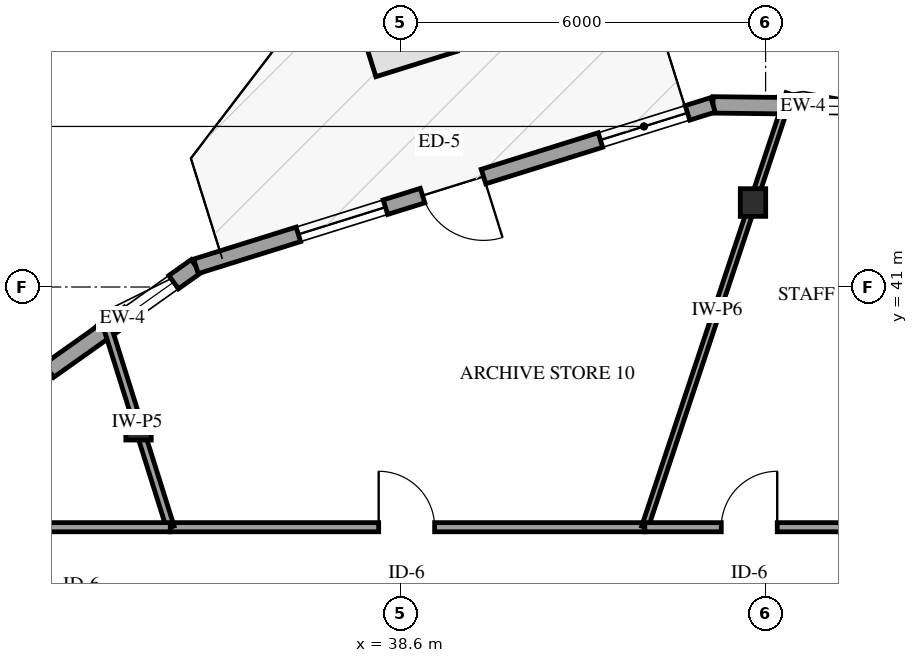
"""IFC4 building model, lengths in metres.
Left out: names, types, materials, properties, quantities, classifications, styles, units other than length and angle.
Written with IfcOpenShell. Run it as: python <this file> out.ifc"""

import sys

from ifc_helpers import new_model, si_unit, direction, frame, frame_2d, origin, origin_2d, place, context, subcontext, project, spatial, rectangle, i_section, extrude, element, fill, save


model = new_model("IFC4")
c1 = context("Model", 3, precision=1e-05, world=origin(), true_north=direction((0.0, 1.0)))
c2 = subcontext(c1, "Body", "Model", "MODEL_VIEW")
j1 = project(units=[si_unit("LENGTHUNIT", "METRE"), si_unit("PLANEANGLEUNIT", "RADIAN")], contexts=[c1])
p1 = place(None, origin())
s1 = spatial("IfcSite", under=j1, at=p1, CompositionType="ELEMENT")
p2 = place(p1, origin())
s2 = spatial("IfcBuilding", under=s1, at=p2, CompositionType="ELEMENT")
p3 = place(p2, frame((0.0, 0.0, 95.2)))
s3 = spatial("IfcBuildingStorey", under=s2, at=p3, CompositionType="ELEMENT", Elevation=95.2)
for number, where, z_axis, x_axis in (
    (1, (44.393, 42.389, 0.0), (0.0, 0.0, 1.0), (1.0, 0.0, 0.0)),
    (2, (34.288, 38.711, 0.0), (0.0, 0.0, 1.0), (1.0, 0.0, 0.0)),
):
    element("IfcColumn", number, at=place(p3, frame(where, z_axis=z_axis, x_axis=x_axis)), inside=s3, PredefinedType="COLUMN", context=c2, shape_type="SweptSolid", body=[
        extrude(i_section(OverallWidth=0.418, OverallDepth=0.455, WebThickness=0.042, FlangeThickness=0.068, FilletRadius=0.038, at=origin_2d()), origin(), (0.0, 0.0, 1.0), 3.9),
    ])
p4 = place(p3, frame((46.702, 43.961, 0.0), z_axis=(0.0, 0.0, 1.0), x_axis=(-0.99993363199, 0.011520920787, 0.0)))
e3 = element("IfcWall", 3, at=p4, inside=s3, PredefinedType="SOLIDWALL", context=c2, shape_type="SweptSolid", body=[
    extrude(rectangle(XDim=2.967, YDim=0.27, at=frame_2d((1.483, 0.0))), origin(), (0.0, 0.0, 1.0), 2.979),
])
p5 = place(p4, frame((0.45, 0.0, 0.75)))
e4 = element("IfcOpeningElement", 4, at=p5, cuts=e3, PredefinedType="OPENING", context=c2, shape_type="SweptSolid", body=[
    extrude(rectangle(XDim=0.9, YDim=1.5, at=frame_2d((0.45, 0.75))), frame((0.0, 0.145, 0.0), z_axis=(0.0, -1.0, 0.0), x_axis=(1.0, 0.0, 0.0)), (0.0, 0.0, 1.0), 0.29),
])
p6 = place(p3, frame((35.232, 41.34, 0.0), z_axis=(0.0, 0.0, 1.0), x_axis=(-0.815686288548, -0.57849449321, 0.0)))
e5 = element("IfcWall", 5, at=p6, inside=s3, PredefinedType="SOLIDWALL", context=c2, shape_type="SweptSolid", body=[
    extrude(rectangle(XDim=2.967, YDim=0.27, at=frame_2d((1.483, 0.0))), origin(), (0.0, 0.0, 1.0), 2.979),
])
p7 = place(p6, frame((0.45, 0.0, 0.75)))
e6 = element("IfcOpeningElement", 6, at=p7, cuts=e5, PredefinedType="OPENING", context=c2, shape_type="SweptSolid", body=[
    extrude(rectangle(XDim=0.9, YDim=1.5, at=frame_2d((0.45, 0.75))), frame((0.0, 0.145, 0.0), z_axis=(0.0, -1.0, 0.0), x_axis=(1.0, 0.0, 0.0)), (0.0, 0.0, 1.0), 0.29),
])
p8 = place(p3, frame((43.735, 43.995, 0.0), z_axis=(0.0, 0.0, 1.0), x_axis=(-0.954555531523, -0.298033114332, 0.0)))
e7 = element("IfcWall", 7, at=p8, inside=s3, PredefinedType="SOLIDWALL", context=c2, shape_type="SweptSolid", body=[
    extrude(rectangle(XDim=8.908, YDim=0.25, at=frame_2d((4.454, 0.0))), origin(), (0.0, 0.0, 1.0), 2.979),
])
p9 = place(p8, frame((3.954, 0.0, 0.0)))
e8 = element("IfcOpeningElement", 8, at=p9, cuts=e7, PredefinedType="OPENING", context=c2, shape_type="SweptSolid", body=[
    extrude(rectangle(XDim=1.05, YDim=2.15, at=frame_2d((0.525, 1.075))), frame((0.0, 0.135, 0.0), z_axis=(0.0, -1.0, 0.0), x_axis=(1.0, 0.0, 0.0)), (0.0, 0.0, 1.0), 0.27),
])
p10 = place(p8, frame((0.44, 0.0, 0.72)))
e9 = element("IfcOpeningElement", 9, at=p10, cuts=e7, PredefinedType="OPENING", context=c2, shape_type="SweptSolid", body=[
    extrude(rectangle(XDim=1.5, YDim=1.7, at=frame_2d((0.75, 0.85))), frame((0.0, 0.135, 0.0), z_axis=(0.0, -1.0, 0.0), x_axis=(1.0, 0.0, 0.0)), (0.0, 0.0, 1.0), 0.27),
])
p11 = place(p8, frame((5.644, 0.0, 0.72)))
e10 = element("IfcOpeningElement", 10, at=p11, cuts=e7, PredefinedType="OPENING", context=c2, shape_type="SweptSolid", body=[
    extrude(rectangle(XDim=1.5, YDim=1.7, at=frame_2d((0.75, 0.85))), frame((0.0, 0.135, 0.0), z_axis=(0.0, -1.0, 0.0), x_axis=(1.0, 0.0, 0.0)), (0.0, 0.0, 1.0), 0.27),
])
p12 = place(p3, frame((34.81, 37.05, 0.0), z_axis=(0.0, 0.0, 1.0), x_axis=(1.0, 0.0, 0.0)))
e11 = element("IfcWall", 11, at=p12, inside=s3, PredefinedType="PARTITIONING", context=c2, shape_type="SweptSolid", body=[
    extrude(rectangle(XDim=7.804, YDim=0.15, at=frame_2d((3.902, 0.0))), origin(), (0.0, 0.0, 1.0), 3.6),
])
p13 = place(p12, frame((3.427, 0.0, 0.0)))
e12 = element("IfcOpeningElement", 12, at=p13, cuts=e11, PredefinedType="OPENING", context=c2, shape_type="SweptSolid", body=[
    extrude(rectangle(XDim=0.92, YDim=2.12, at=frame_2d((0.46, 1.06))), frame((0.0, 0.085, 0.0), z_axis=(0.0, -1.0, 0.0), x_axis=(1.0, 0.0, 0.0)), (0.0, 0.0, 1.0), 0.17),
])
p14 = place(p3, frame((42.614, 37.05, 0.0), z_axis=(0.0, 0.0, 1.0), x_axis=(0.316071805261, 0.948735270726, 0.0)))
e13 = element("IfcWall", 13, at=p14, inside=s3, PredefinedType="PARTITIONING", context=c2, shape_type="SweptSolid", body=[
    extrude(rectangle(XDim=7.514, YDim=0.11, at=frame_2d((3.757, 0.0))), origin(), (0.0, 0.0, 1.0), 2.895),
])
p15 = place(p3, frame((34.81, 37.05, 0.0), z_axis=(0.0, 0.0, 1.0), x_axis=(-0.300097719363, 0.953908464599, 0.0)))
e14 = element("IfcWall", 14, at=p15, inside=s3, PredefinedType="PARTITIONING", context=c2, shape_type="SweptSolid", body=[
    extrude(rectangle(XDim=3.629, YDim=0.13, at=frame_2d((1.814, 0.0))), origin(), (0.0, 0.0, 1.0), 2.895),
])
p16 = place(p3, frame((42.614, 37.05, 0.0), z_axis=(0.0, 0.0, 1.0), x_axis=(1.0, 0.0, 0.0)))
e15 = element("IfcWall", 15, at=p16, inside=s3, PredefinedType="PARTITIONING", context=c2, shape_type="SweptSolid", body=[
    extrude(rectangle(XDim=3.463, YDim=0.15, at=frame_2d((1.731, 0.0))), origin(), (0.0, 0.0, 1.0), 3.6),
])
p17 = place(p16, frame((1.257, 0.0, 0.0)))
e16 = element("IfcOpeningElement", 16, at=p17, cuts=e15, PredefinedType="OPENING", context=c2, shape_type="SweptSolid", body=[
    extrude(rectangle(XDim=0.92, YDim=2.12, at=frame_2d((0.46, 1.06))), frame((0.0, 0.085, 0.0), z_axis=(0.0, -1.0, 0.0), x_axis=(1.0, 0.0, 0.0)), (0.0, 0.0, 1.0), 0.17),
])
p18 = place(p3, frame((32.67, 37.05, 0.0), z_axis=(0.0, 0.0, 1.0), x_axis=(1.0, 0.0, 0.0)))
e17 = element("IfcWall", 17, at=p18, inside=s3, PredefinedType="PARTITIONING", context=c2, shape_type="SweptSolid", body=[
    extrude(rectangle(XDim=2.14, YDim=0.15, at=frame_2d((1.07, 0.0))), origin(), (0.0, 0.0, 1.0), 3.6),
])
p19 = place(p5, origin())
e18 = element("IfcWindow", 18, at=p19, inside=s3, PartitioningType="SINGLE_PANEL", PredefinedType="WINDOW", context=c2, shape_type="SweptSolid", body=[
    extrude(rectangle(XDim=0.9, YDim=1.5, at=frame_2d((0.45, 0.75))), frame((0.0, 0.03, 0.0), z_axis=(0.0, -1.0, 0.0), x_axis=(1.0, 0.0, 0.0)), (0.0, 0.0, 1.0), 0.06),
])
fill(e4, e18)
p20 = place(p7, origin())
e19 = element("IfcWindow", 19, at=p20, inside=s3, PartitioningType="SINGLE_PANEL", PredefinedType="WINDOW", context=c2, shape_type="SweptSolid", body=[
    extrude(rectangle(XDim=0.9, YDim=1.5, at=frame_2d((0.45, 0.75))), frame((0.0, 0.03, 0.0), z_axis=(0.0, -1.0, 0.0), x_axis=(1.0, 0.0, 0.0)), (0.0, 0.0, 1.0), 0.06),
])
fill(e6, e19)
p21 = place(p9, origin())
e20 = element("IfcDoor", 20, at=p21, inside=s3, OperationType="SINGLE_SWING_LEFT", PredefinedType="DOOR", context=c2, shape_type="SweptSolid", body=[
    extrude(rectangle(XDim=1.05, YDim=2.15, at=frame_2d((0.525, 1.075))), frame((0.0, 0.025, 0.0), z_axis=(0.0, -1.0, 0.0), x_axis=(1.0, 0.0, 0.0)), (0.0, 0.0, 1.0), 0.05),
])
fill(e8, e20)
p22 = place(p10, origin())
e21 = element("IfcWindow", 21, at=p22, inside=s3, PartitioningType="SINGLE_PANEL", PredefinedType="WINDOW", context=c2, shape_type="SweptSolid", body=[
    extrude(rectangle(XDim=1.5, YDim=1.7, at=frame_2d((0.75, 0.85))), frame((0.0, 0.03, 0.0), z_axis=(0.0, -1.0, 0.0), x_axis=(1.0, 0.0, 0.0)), (0.0, 0.0, 1.0), 0.06),
])
fill(e9, e21)
p23 = place(p11, origin())
e22 = element("IfcWindow", 22, at=p23, inside=s3, PartitioningType="SINGLE_PANEL", PredefinedType="WINDOW", context=c2, shape_type="SweptSolid", body=[
    extrude(rectangle(XDim=1.5, YDim=1.7, at=frame_2d((0.75, 0.85))), frame((0.0, 0.03, 0.0), z_axis=(0.0, -1.0, 0.0), x_axis=(1.0, 0.0, 0.0)), (0.0, 0.0, 1.0), 0.06),
])
fill(e10, e22)
p24 = place(p13, origin())
e23 = element("IfcDoor", 23, at=p24, inside=s3, OperationType="SINGLE_SWING_LEFT", PredefinedType="DOOR", context=c2, shape_type="SweptSolid", body=[
    extrude(rectangle(XDim=0.92, YDim=2.12, at=frame_2d((0.46, 1.06))), frame((0.0, 0.025, 0.0), z_axis=(0.0, -1.0, 0.0), x_axis=(1.0, 0.0, 0.0)), (0.0, 0.0, 1.0), 0.05),
])
fill(e12, e23)
p25 = place(p17, origin())
e24 = element("IfcDoor", 24, at=p25, inside=s3, OperationType="SINGLE_SWING_RIGHT", PredefinedType="DOOR", context=c2, shape_type="SweptSolid", body=[
    extrude(rectangle(XDim=0.92, YDim=2.12, at=frame_2d((0.46, 1.06))), frame((0.0, 0.025, 0.0), z_axis=(0.0, -1.0, 0.0), x_axis=(1.0, 0.0, 0.0)), (0.0, 0.0, 1.0), 0.05),
])
fill(e16, e24)
save(model, sys.argv[1])
